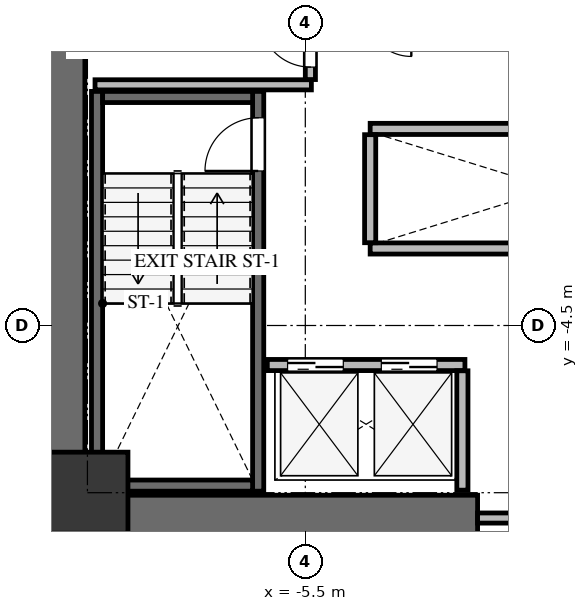
"""IFC4 building model, lengths in metres.
Left out: names, types, materials, properties, quantities, classifications, styles, units other than length and angle.
Written with IfcOpenShell. Run it as: python <this file> out.ifc"""

import sys

from ifc_helpers import new_model, si_unit, direction, frame, frame_2d, origin, origin_2d, place, context, subcontext, project, spatial, rectangle, extrude, source, transform, mapped, element, fill, save


model = new_model("IFC4")
c1 = context("Model", 3, precision=1e-05, world=origin(), true_north=direction((0.0, 1.0)))
c2 = subcontext(c1, "Body", "Model", "MODEL_VIEW")
j1 = project(units=[si_unit("LENGTHUNIT", "METRE"), si_unit("PLANEANGLEUNIT", "RADIAN")], contexts=[c1])
p1 = place(None, origin())
s1 = spatial("IfcSite", under=j1, at=p1, CompositionType="ELEMENT")
p2 = place(p1, origin())
s2 = spatial("IfcBuilding", under=s1, at=p2, CompositionType="ELEMENT")
p3 = place(p2, frame((0.0, 0.0, 35.7)))
s3 = spatial("IfcBuildingStorey", under=s2, at=p3, CompositionType="ELEMENT", Elevation=35.7)
p4 = place(p3, frame((-10.3, -8.75, 0.0), z_axis=(0.0, 0.0, 1.0), x_axis=(0.0, 1.0, 0.0)))
e1 = element("IfcWall", 1, at=p4, inside=s3, PredefinedType="SHEAR", context=c2, shape_type="SweptSolid", body=[
    extrude(rectangle(XDim=17.5, YDim=0.9, at=frame_2d((8.75, 0.0))), origin(), (0.0, 0.0, 1.0), 3.3),
])
p5 = place(p3, frame((-9.85, -8.3, 0.0), z_axis=(0.0, 0.0, 1.0), x_axis=(1.0, 0.0, 0.0)))
e2 = element("IfcWall", 2, at=p5, inside=s3, PredefinedType="SHEAR", context=c2, shape_type="SweptSolid", body=[
    extrude(rectangle(XDim=7.75, YDim=0.9, at=frame_2d((3.875, 0.0))), origin(), (0.0, 0.0, 1.0), 3.3),
])
p6 = place(p3, frame((-6.43, -7.77, -0.24), z_axis=(0.0, 0.0, 1.0), x_axis=(0.0, 1.0, 0.0)))
e3 = element("IfcWall", 3, at=p6, inside=s3, PredefinedType="SHEAR", context=c2, shape_type="SweptSolid", body=[
    extrude(rectangle(XDim=7.89, YDim=0.22, at=frame_2d((3.945, 0.0))), origin(), (0.0, 0.0, 1.0), 3.3),
])
p7 = place(p6, frame((6.32, 0.0, 0.0)))
e4 = element("IfcOpeningElement", 4, at=p7, cuts=e3, PredefinedType="OPENING", context=c2, shape_type="SweptSolid", body=[
    extrude(rectangle(XDim=1.05, YDim=2.15, at=frame_2d((0.525, 1.075))), frame((0.0, 0.12, 0.0), z_axis=(0.0, -1.0, 0.0), x_axis=(1.0, 0.0, 0.0)), (0.0, 0.0, 1.0), 0.24),
])
p8 = place(p3, frame((-9.61, 0.12, -0.24), z_axis=(0.0, 0.0, 1.0), x_axis=(0.0, -1.0, 0.0)))
e5 = element("IfcWall", 5, at=p8, inside=s3, PredefinedType="SHEAR", context=c2, shape_type="SweptSolid", body=[
    extrude(rectangle(XDim=7.89, YDim=0.22, at=frame_2d((3.945, 0.0))), origin(), (0.0, 0.0, 1.0), 3.3),
])
for number, where, z_axis, x_axis in (
    (6, (-9.5, -7.66, -0.24), (0.0, 0.0, 1.0), (1.0, 0.0, 0.0)),
    (7, (-6.54, 0.01, -0.24), (0.0, 0.0, 1.0), (-1.0, 0.0, 0.0)),
):
    element("IfcWall", number, at=place(p3, frame(where, z_axis=z_axis, x_axis=x_axis)), inside=s3, PredefinedType="SHEAR", context=c2, shape_type="SweptSolid", body=[
        extrude(rectangle(XDim=2.96, YDim=0.22, at=frame_2d((1.48, 0.0))), origin(), (0.0, 0.0, 1.0), 3.3),
    ])
m1 = source(origin(), c2, "Body", "SweptSolid", [
    extrude(rectangle(XDim=1.6, YDim=1.6, at=origin_2d()), origin(), (0.0, 0.0, 1.0), 3.3),
])
p9 = place(p3, frame((-9.8, -7.8, -0.24), z_axis=(0.0, 0.0, 1.0), x_axis=(1.0, 0.0, 0.0)))
e8 = element("IfcColumn", 8, at=p9, inside=s3, PredefinedType="COLUMN", context=c2, shape_type="MappedRepresentation", body=[
    mapped(m1, transform((0.0, 0.0, 0.0), x_axis=(1.0, 0.0, 0.0), y_axis=(0.0, 1.0, 0.0), z_axis=(0.0, 0.0, 1.0), scale=1.0)),
])
p10 = place(p3, frame((-2.1, -8.3, 0.0), z_axis=(0.0, 0.0, 1.0), x_axis=(1.0, 0.0, 0.0)))
e9 = element("IfcWall", 9, at=p10, inside=s3, PredefinedType="SOLIDWALL", context=c2, shape_type="SweptSolid", body=[
    extrude(rectangle(XDim=4.2, YDim=0.2, at=frame_2d((2.1, 0.0))), origin(), (0.0, 0.0, 1.0), 3.045),
])
p11 = place(p10, frame((1.2, 0.0, 0.0)))
e10 = element("IfcOpeningElement", 10, at=p11, cuts=e9, PredefinedType="OPENING", context=c2, shape_type="SweptSolid", body=[
    extrude(rectangle(XDim=1.8, YDim=2.15, at=frame_2d((0.9, 1.075))), frame((0.0, 0.11, 0.0), z_axis=(0.0, -1.0, 0.0), x_axis=(1.0, 0.0, 0.0)), (0.0, 0.0, 1.0), 0.22),
])
p12 = place(p3, frame((-9.65, 0.25, 0.0), z_axis=(0.0, 0.0, 1.0), x_axis=(1.0, 0.0, 0.0)))
e11 = element("IfcWall", 11, at=p12, inside=s3, PredefinedType="SOLIDWALL", context=c2, shape_type="SweptSolid", body=[
    extrude(rectangle(XDim=4.27, YDim=0.2, at=frame_2d((2.135, 0.0))), origin(), (0.0, 0.0, 1.0), 3.045),
])
p13 = place(p3, frame((-5.4, 0.354, 0.0), z_axis=(0.0, 0.0, 1.0), x_axis=(0.0, 1.0, 0.0)))
e12 = element("IfcWall", 12, at=p13, inside=s3, PredefinedType="SOLIDWALL", context=c2, shape_type="SweptSolid", body=[
    extrude(rectangle(XDim=4.026, YDim=0.2, at=frame_2d((2.013, 0.0))), origin(), (0.0, 0.0, 1.0), 3.045),
])
p14 = place(p13, frame((0.246, 0.0, 0.0)))
e13 = element("IfcOpeningElement", 13, at=p14, cuts=e12, PredefinedType="OPENING", context=c2, shape_type="SweptSolid", body=[
    extrude(rectangle(XDim=1.0, YDim=2.15, at=frame_2d((0.5, 1.075))), frame((0.0, 0.11, 0.0), z_axis=(0.0, -1.0, 0.0), x_axis=(1.0, 0.0, 0.0)), (0.0, 0.0, 1.0), 0.22),
])
p15 = place(p3, frame((-6.25, -5.28, 0.0), z_axis=(0.0, 0.0, 1.0), x_axis=(1.0, 0.0, 0.0)))
e14 = element("IfcWall", 14, at=p15, inside=s3, PredefinedType="SOLIDWALL", context=c2, shape_type="SweptSolid", body=[
    extrude(rectangle(XDim=3.9, YDim=0.22, at=frame_2d((1.95, 0.0))), origin(), (0.0, 0.0, 1.0), 3.045),
])
p16 = place(p15, frame((0.4, 0.0, 0.0)))
e15 = element("IfcOpeningElement", 15, at=p16, cuts=e14, PredefinedType="OPENING", context=c2, shape_type="SweptSolid", body=[
    extrude(rectangle(XDim=1.1, YDim=2.15, at=frame_2d((0.55, 1.075))), frame((0.0, 0.12, 0.0), z_axis=(0.0, -1.0, 0.0), x_axis=(1.0, 0.0, 0.0)), (0.0, 0.0, 1.0), 0.24),
])
p17 = place(p15, frame((2.25, 0.0, 0.0)))
e16 = element("IfcOpeningElement", 16, at=p17, cuts=e14, PredefinedType="OPENING", context=c2, shape_type="SweptSolid", body=[
    extrude(rectangle(XDim=1.1, YDim=2.15, at=frame_2d((0.55, 1.075))), frame((0.0, 0.12, 0.0), z_axis=(0.0, -1.0, 0.0), x_axis=(1.0, 0.0, 0.0)), (0.0, 0.0, 1.0), 0.24),
])
p18 = place(p3, frame((-2.4, -7.75, 0.0), z_axis=(0.0, 0.0, 1.0), x_axis=(0.0, 1.0, 0.0)))
e17 = element("IfcWall", 17, at=p18, inside=s3, PredefinedType="SOLIDWALL", context=c2, shape_type="SweptSolid", body=[
    extrude(rectangle(XDim=2.356, YDim=0.22, at=frame_2d((1.178, 0.0))), origin(), (0.0, 0.0, 1.0), 3.045),
])
for number, where, z_axis, x_axis in (
    (18, (-4.22, -2.98, 0.0), (0.0, 0.0, 1.0), (1.0, 0.0, 0.0)),
    (19, (-4.22, -0.62, 0.0), (0.0, 0.0, 1.0), (1.0, 0.0, 0.0)),
):
    element("IfcWall", number, at=place(p3, frame(where, z_axis=z_axis, x_axis=x_axis)), inside=s3, PredefinedType="SOLIDWALL", context=c2, shape_type="SweptSolid", body=[
        extrude(rectangle(XDim=7.24, YDim=0.22, at=frame_2d((3.62, 0.0))), origin(), (0.0, 0.0, 1.0), 3.045),
    ])
p19 = place(p3, frame((-4.22, -2.866, 0.0), z_axis=(0.0, 0.0, 1.0), x_axis=(0.0, 1.0, 0.0)))
e20 = element("IfcWall", 20, at=p19, inside=s3, PredefinedType="SOLIDWALL", context=c2, shape_type="SweptSolid", body=[
    extrude(rectangle(XDim=2.132, YDim=0.22, at=frame_2d((1.066, 0.0))), origin(), (0.0, 0.0, 1.0), 3.045),
])
m2 = source(origin(), c2, "Body", "SweptSolid", [
    extrude(rectangle(XDim=1.05, YDim=2.15, at=frame_2d((0.525, 1.075))), frame((0.0, 0.025, 0.0), z_axis=(0.0, -1.0, 0.0), x_axis=(1.0, 0.0, 0.0)), (0.0, 0.0, 1.0), 0.05),
])
p20 = place(p7, origin())
e21 = element("IfcDoor", 21, at=p20, inside=s3, OperationType="SINGLE_SWING_LEFT", PredefinedType="DOOR", context=c2, shape_type="MappedRepresentation", body=[
    mapped(m2, transform((0.0, 0.0, 0.0), x_axis=(1.0, 0.0, 0.0), y_axis=(0.0, 1.0, 0.0), z_axis=(0.0, 0.0, 1.0), scale=1.0)),
])
fill(e4, e21)
m3 = source(origin(), c2, "Body", "SweptSolid", [
    extrude(rectangle(XDim=1.0, YDim=2.15, at=frame_2d((0.5, 1.075))), frame((0.0, 0.025, 0.0), z_axis=(0.0, -1.0, 0.0), x_axis=(1.0, 0.0, 0.0)), (0.0, 0.0, 1.0), 0.05),
])
p21 = place(p14, origin())
e22 = element("IfcDoor", 22, at=p21, inside=s3, OperationType="SINGLE_SWING_RIGHT", PredefinedType="DOOR", context=c2, shape_type="MappedRepresentation", body=[
    mapped(m3, transform((0.0, 0.0, 0.0), x_axis=(1.0, 0.0, 0.0), y_axis=(0.0, 1.0, 0.0), z_axis=(0.0, 0.0, 1.0), scale=1.0)),
])
fill(e13, e22)
m4 = source(origin(), c2, "Body", "SweptSolid", [
    extrude(rectangle(XDim=1.1, YDim=2.15, at=frame_2d((0.55, 1.075))), frame((0.0, 0.025, 0.0), z_axis=(0.0, -1.0, 0.0), x_axis=(1.0, 0.0, 0.0)), (0.0, 0.0, 1.0), 0.05),
])
p22 = place(p16, origin())
e23 = element("IfcDoor", 23, at=p22, inside=s3, OperationType="DOUBLE_DOOR_SLIDING", PredefinedType="DOOR", context=c2, shape_type="MappedRepresentation", body=[
    mapped(m4, transform((0.0, 0.0, 0.0), x_axis=(1.0, 0.0, 0.0), y_axis=(0.0, 1.0, 0.0), z_axis=(0.0, 0.0, 1.0), scale=1.0)),
])
fill(e15, e23)
p23 = place(p17, origin())
e24 = element("IfcDoor", 24, at=p23, inside=s3, OperationType="DOUBLE_DOOR_SLIDING", PredefinedType="DOOR", context=c2, shape_type="MappedRepresentation", body=[
    mapped(m4, transform((0.0, 0.0, 0.0), x_axis=(1.0, 0.0, 0.0), y_axis=(0.0, 1.0, 0.0), z_axis=(0.0, 0.0, 1.0), scale=1.0)),
])
fill(e16, e24)
save(model, sys.argv[1])
